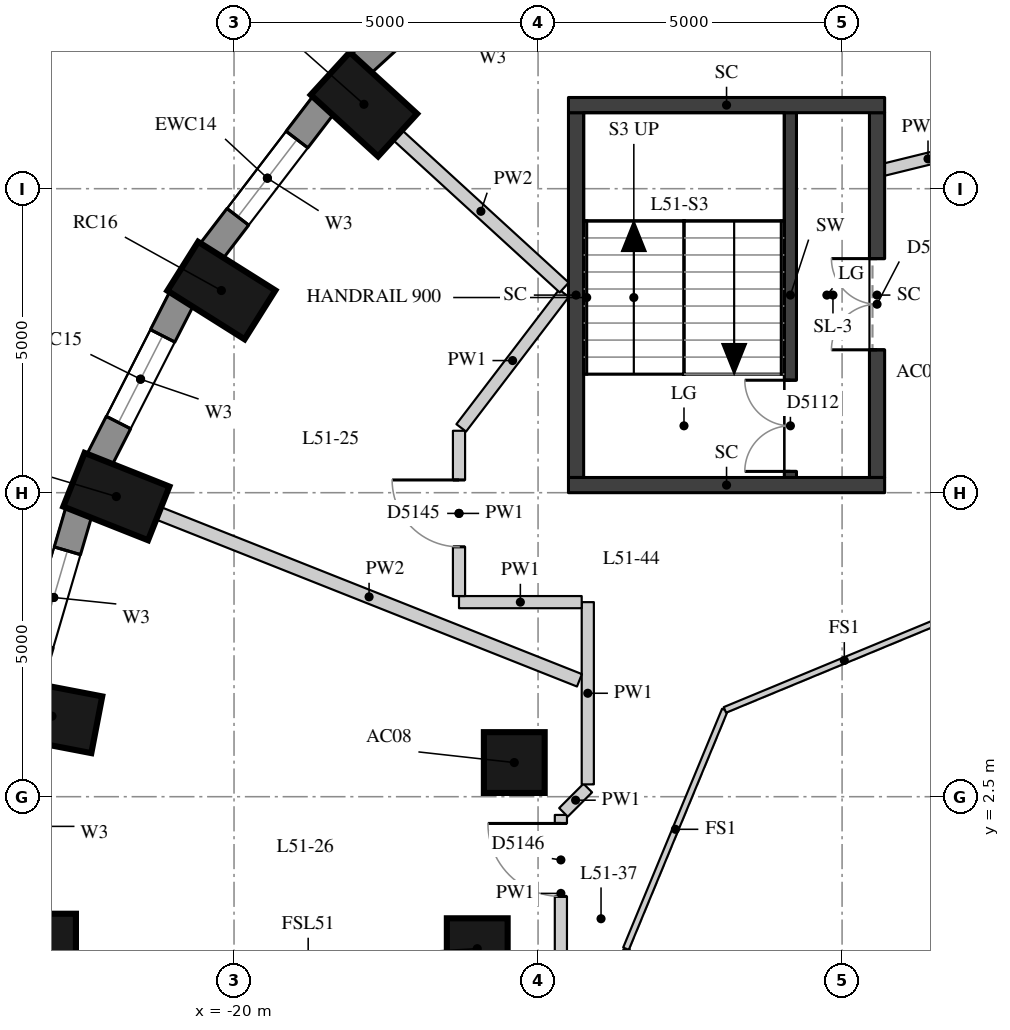
"""IFC4 building model, lengths in metres.
Left out: names, types, materials, properties, quantities, classifications, styles, units other than length and angle.
Written with IfcOpenShell. Run it as: python <this file> out.ifc"""

import sys

from ifc_helpers import new_model, si_unit, direction, frame, frame_2d, origin, origin_2d, place, context, subcontext, project, spatial, rectangle, extrude, element, fill, save


model = new_model("IFC4")
c1 = context("Model", 3, precision=1e-05, world=origin(), true_north=direction((0.0, 1.0)))
c2 = subcontext(c1, "Body", "Model", "MODEL_VIEW")
j1 = project(units=[si_unit("LENGTHUNIT", "METRE"), si_unit("PLANEANGLEUNIT", "RADIAN")], contexts=[c1])
p1 = place(None, origin())
s1 = spatial("IfcSite", under=j1, at=p1, CompositionType="ELEMENT")
p2 = place(p1, origin())
s2 = spatial("IfcBuilding", under=s1, at=p2, CompositionType="ELEMENT")
p3 = place(p2, frame((0.0, 0.0, 181.4)))
s3 = spatial("IfcBuildingStorey", under=s2, at=p3, CompositionType="ELEMENT", Elevation=181.4)
for number, where, z_axis, x_axis in (
    (1, (-17.864, 13.888, 0.0), (0.0, 0.0, 1.0), (-0.738, 0.675, 0.0)),
    (2, (-20.208, 10.825, 0.0), (0.0, 0.0, 1.0), (-0.846, 0.533, 0.0)),
    (3, (-21.936, 7.436, 0.0), (0.0, 0.0, 1.0), (-0.93, 0.369, 0.0)),
    (4, (-22.994, 3.825, 0.0), (0.0, 0.0, 1.0), (-0.982, 0.189, 0.0)),
    (5, (-23.35, 0.1, 0.0), (0.0, 0.0, 1.0), (-1.0, 0.0, 0.0)),
):
    element("IfcColumn", number, at=place(p3, frame(where, z_axis=z_axis, x_axis=x_axis)), inside=s3, PredefinedType="COLUMN", context=c2, shape_type="SweptSolid", body=[
        extrude(rectangle(XDim=1.5, YDim=0.95, at=origin_2d()), origin(), (0.0, 0.0, 1.0), 3.3),
    ])
for number, where, z_axis, x_axis in (
    (6, (-15.391, 3.062, 0.0), (0.0, 0.0, 1.0), (1.0, 0.0, 0.0)),
    (7, (-16.0, 0.0, 0.0), (0.0, 0.0, 1.0), (1.0, 0.0, 0.0)),
):
    element("IfcColumn", number, at=place(p3, frame(where, z_axis=z_axis, x_axis=x_axis)), inside=s3, PredefinedType="COLUMN", context=c2, shape_type="SweptSolid", body=[
        extrude(rectangle(XDim=1.0, YDim=1.0, at=origin_2d()), origin(), (0.0, 0.0, 1.0), 3.3),
    ])
p4 = place(p3, frame((-15.63, 16.639, 0.0), z_axis=(0.0, 0.0, 1.0), x_axis=(-0.737808755941, -0.675009807082, 0.0)))
e8 = element("IfcWall", 8, at=p4, inside=s3, PredefinedType="SOLIDWALL", context=c2, shape_type="SweptSolid", body=[
    extrude(rectangle(XDim=3.094, YDim=0.45, at=frame_2d((1.547, 0.0))), origin(), (0.0, 0.0, 1.0), 2.85),
])
p5 = place(p4, frame((0.747, 0.0, 0.4)))
e9 = element("IfcOpeningElement", 9, at=p5, cuts=e8, PredefinedType="OPENING", context=c2, shape_type="SweptSolid", body=[
    extrude(rectangle(XDim=1.6, YDim=1.75, at=frame_2d((0.8, 0.875))), frame((0.0, 0.235, 0.0), z_axis=(0.0, -1.0, 0.0), x_axis=(1.0, 0.0, 0.0)), (0.0, 0.0, 1.0), 0.47),
])
p6 = place(p3, frame((-18.528, 13.879, 0.0), z_axis=(0.0, 0.0, 1.0), x_axis=(-0.607817056371, -0.794077090706, 0.0)))
e10 = element("IfcWall", 10, at=p6, inside=s3, PredefinedType="SOLIDWALL", context=c2, shape_type="SweptSolid", body=[
    extrude(rectangle(XDim=3.037, YDim=0.45, at=frame_2d((1.519, 0.0))), origin(), (0.0, 0.0, 1.0), 2.85),
])
p7 = place(p6, frame((0.719, 0.0, 0.4)))
e11 = element("IfcOpeningElement", 11, at=p7, cuts=e10, PredefinedType="OPENING", context=c2, shape_type="SweptSolid", body=[
    extrude(rectangle(XDim=1.6, YDim=1.75, at=frame_2d((0.8, 0.875))), frame((0.0, 0.235, 0.0), z_axis=(0.0, -1.0, 0.0), x_axis=(1.0, 0.0, 0.0)), (0.0, 0.0, 1.0), 0.47),
])
p8 = place(p3, frame((-20.859, 10.697, 0.0), z_axis=(0.0, 0.0, 1.0), x_axis=(-0.454133999889, -0.890933392653, 0.0)))
e12 = element("IfcWall", 12, at=p8, inside=s3, PredefinedType="SOLIDWALL", context=c2, shape_type="SweptSolid", body=[
    extrude(rectangle(XDim=2.986, YDim=0.45, at=frame_2d((1.493, 0.0))), origin(), (0.0, 0.0, 1.0), 2.85),
])
p9 = place(p8, frame((0.693, 0.0, 0.4)))
e13 = element("IfcOpeningElement", 13, at=p9, cuts=e12, PredefinedType="OPENING", context=c2, shape_type="SweptSolid", body=[
    extrude(rectangle(XDim=1.6, YDim=1.75, at=frame_2d((0.8, 0.875))), frame((0.0, 0.235, 0.0), z_axis=(0.0, -1.0, 0.0), x_axis=(1.0, 0.0, 0.0)), (0.0, 0.0, 1.0), 0.47),
])
p10 = place(p3, frame((-22.551, 7.191, 0.0), z_axis=(0.0, 0.0, 1.0), x_axis=(-0.281125768296, -0.959670934435, 0.0)))
e14 = element("IfcWall", 14, at=p10, inside=s3, PredefinedType="SOLIDWALL", context=c2, shape_type="SweptSolid", body=[
    extrude(rectangle(XDim=2.948, YDim=0.45, at=frame_2d((1.474, 0.0))), origin(), (0.0, 0.0, 1.0), 2.85),
])
p11 = place(p10, frame((0.674, 0.0, 0.4)))
e15 = element("IfcOpeningElement", 15, at=p11, cuts=e14, PredefinedType="OPENING", context=c2, shape_type="SweptSolid", body=[
    extrude(rectangle(XDim=1.6, YDim=1.75, at=frame_2d((0.8, 0.875))), frame((0.0, 0.235, 0.0), z_axis=(0.0, -1.0, 0.0), x_axis=(1.0, 0.0, 0.0)), (0.0, 0.0, 1.0), 0.47),
])
p12 = place(p3, frame((-10.85, 7.75, 0.0), z_axis=(0.0, 0.0, 1.0), x_axis=(0.0, 1.0, 0.0)))
e16 = element("IfcWall", 16, at=p12, inside=s3, PredefinedType="SHEAR", context=c2, shape_type="SweptSolid", body=[
    extrude(rectangle(XDim=6.0, YDim=0.2, at=frame_2d((3.0, 0.0))), origin(), (0.0, 0.0, 1.0), 2.85),
])
p13 = place(p12, frame((0.1, 0.0, 0.0)))
e17 = element("IfcOpeningElement", 17, at=p13, cuts=e16, PredefinedType="OPENING", context=c2, shape_type="SweptSolid", body=[
    extrude(rectangle(XDim=1.5, YDim=2.1, at=frame_2d((0.75, 1.05))), frame((0.0, 0.11, 0.0), z_axis=(0.0, -1.0, 0.0), x_axis=(1.0, 0.0, 0.0)), (0.0, 0.0, 1.0), 0.22),
])
p14 = place(p3, frame((-14.375, 7.75, -0.28), z_axis=(0.0, 0.0, 1.0), x_axis=(0.0, 1.0, 0.0)))
e18 = element("IfcWall", 18, at=p14, inside=s3, PredefinedType="SHEAR", context=c2, shape_type="SweptSolid", body=[
    extrude(rectangle(XDim=6.0, YDim=0.25, at=frame_2d((3.0, 0.0))), origin(), (0.0, 0.0, 1.0), 3.13),
])
p15 = place(p3, frame((-9.425, 7.75, -0.28), z_axis=(0.0, 0.0, 1.0), x_axis=(0.0, 1.0, 0.0)))
e19 = element("IfcWall", 19, at=p15, inside=s3, PredefinedType="SHEAR", context=c2, shape_type="SweptSolid", body=[
    extrude(rectangle(XDim=6.0, YDim=0.25, at=frame_2d((3.0, 0.0))), origin(), (0.0, 0.0, 1.0), 3.13),
])
p16 = place(p15, frame((2.1, 0.0, 0.28)))
e20 = element("IfcOpeningElement", 20, at=p16, cuts=e19, PredefinedType="OPENING", context=c2, shape_type="SweptSolid", body=[
    extrude(rectangle(XDim=1.5, YDim=2.1, at=frame_2d((0.75, 1.05))), frame((0.0, 0.135, 0.0), z_axis=(0.0, -1.0, 0.0), x_axis=(1.0, 0.0, 0.0)), (0.0, 0.0, 1.0), 0.27),
])
for number, where, z_axis, x_axis in (
    (21, (-14.5, 13.875, -0.28), (0.0, 0.0, 1.0), (1.0, 0.0, 0.0)),
    (22, (-14.5, 7.625, -0.28), (0.0, 0.0, 1.0), (1.0, 0.0, 0.0)),
):
    element("IfcWall", number, at=place(p3, frame(where, z_axis=z_axis, x_axis=x_axis)), inside=s3, PredefinedType="SHEAR", context=c2, shape_type="SweptSolid", body=[
        extrude(rectangle(XDim=5.2, YDim=0.25, at=frame_2d((2.6, 0.0))), origin(), (0.0, 0.0, 1.0), 3.13),
    ])
p17 = place(p3, frame((-14.625, -0.381, 0.0), z_axis=(0.0, 0.0, 1.0), x_axis=(0.0, 1.0, 0.0)))
e23 = element("IfcWall", 23, at=p17, inside=s3, PredefinedType="PARTITIONING", context=c2, shape_type="SweptSolid", body=[
    extrude(rectangle(XDim=2.581, YDim=0.2, at=frame_2d((1.291, 0.0))), origin(), (0.0, 0.0, 1.0), 2.85),
])
p18 = place(p17, frame((1.241, 0.0, 0.0)))
e24 = element("IfcOpeningElement", 24, at=p18, cuts=e23, PredefinedType="OPENING", context=c2, shape_type="SweptSolid", body=[
    extrude(rectangle(XDim=1.2, YDim=2.1, at=frame_2d((0.6, 1.05))), frame((0.0, 0.11, 0.0), z_axis=(0.0, -1.0, 0.0), x_axis=(1.0, 0.0, 0.0)), (0.0, 0.0, 1.0), 0.22),
])
p19 = place(p3, frame((-14.582, 2.242, 0.0), z_axis=(0.0, 0.0, 1.0), x_axis=(0.706890969579, 0.707322526948, 0.0)))
e25 = element("IfcWall", 25, at=p19, inside=s3, PredefinedType="PARTITIONING", context=c2, shape_type="SweptSolid", body=[
    extrude(rectangle(XDim=0.566, YDim=0.2, at=frame_2d((0.283, 0.0))), origin(), (0.0, 0.0, 1.0), 2.85),
])
p20 = place(p3, frame((-14.182, 2.703, 0.0), z_axis=(0.0, 0.0, 1.0), x_axis=(0.0, 1.0, 0.0)))
e26 = element("IfcWall", 26, at=p20, inside=s3, PredefinedType="PARTITIONING", context=c2, shape_type="SweptSolid", body=[
    extrude(rectangle(XDim=2.997, YDim=0.2, at=frame_2d((1.499, 0.0))), origin(), (0.0, 0.0, 1.0), 2.85),
])
p21 = place(p3, frame((-14.282, 5.7, 0.0), z_axis=(0.0, 0.0, 1.0), x_axis=(-1.0, 0.0, 0.0)))
e27 = element("IfcWall", 27, at=p21, inside=s3, PredefinedType="PARTITIONING", context=c2, shape_type="SweptSolid", body=[
    extrude(rectangle(XDim=2.018, YDim=0.2, at=frame_2d((1.009, 0.0))), origin(), (0.0, 0.0, 1.0), 2.85),
])
p22 = place(p3, frame((-16.3, 5.8, 0.0), z_axis=(0.0, 0.0, 1.0), x_axis=(0.0, 1.0, 0.0)))
e28 = element("IfcWall", 28, at=p22, inside=s3, PredefinedType="PARTITIONING", context=c2, shape_type="SweptSolid", body=[
    extrude(rectangle(XDim=2.719, YDim=0.2, at=frame_2d((1.359, 0.0))), origin(), (0.0, 0.0, 1.0), 2.85),
])
p23 = place(p22, frame((0.809, 0.0, 0.0)))
e29 = element("IfcOpeningElement", 29, at=p23, cuts=e28, PredefinedType="OPENING", context=c2, shape_type="SweptSolid", body=[
    extrude(rectangle(XDim=1.1, YDim=2.1, at=frame_2d((0.55, 1.05))), frame((0.0, 0.11, 0.0), z_axis=(0.0, -1.0, 0.0), x_axis=(1.0, 0.0, 0.0)), (0.0, 0.0, 1.0), 0.22),
])
p24 = place(p3, frame((-16.263, 8.566, 0.0), z_axis=(0.0, 0.0, 1.0), x_axis=(0.606668946119, 0.794954583492, 0.0)))
e30 = element("IfcWall", 30, at=p24, inside=s3, PredefinedType="PARTITIONING", context=c2, shape_type="SweptSolid", body=[
    extrude(rectangle(XDim=2.785, YDim=0.2, at=frame_2d((1.393, 0.0))), origin(), (0.0, 0.0, 1.0), 2.85),
])
p25 = place(p3, frame((-9.474, 12.773, 0.0), z_axis=(0.0, 0.0, 1.0), x_axis=(0.971086426401, 0.238728197874, 0.0)))
e31 = element("IfcWall", 31, at=p25, inside=s3, PredefinedType="PARTITIONING", context=c2, shape_type="SweptSolid", body=[
    extrude(rectangle(XDim=1.826, YDim=0.2, at=frame_2d((0.913, 0.0))), origin(), (0.0, 0.0, 1.0), 2.4),
])
p26 = place(p3, frame((-17.31, 13.382, 0.0), z_axis=(0.0, 0.0, 1.0), x_axis=(0.737827699829, -0.674989100182, 0.0)))
e32 = element("IfcWall", 32, at=p26, inside=s3, PredefinedType="PARTITIONING", context=c2, shape_type="SweptSolid", body=[
    extrude(rectangle(XDim=3.714, YDim=0.22, at=frame_2d((1.857, 0.0))), origin(), (0.0, 0.0, 1.0), 2.85),
])
p27 = place(p3, frame((-21.239, 7.16, 0.0), z_axis=(0.0, 0.0, 1.0), x_axis=(0.929511234156, -0.368793798182, 0.0)))
e33 = element("IfcWall", 33, at=p27, inside=s3, PredefinedType="PARTITIONING", context=c2, shape_type="SweptSolid", body=[
    extrude(rectangle(XDim=7.444, YDim=0.22, at=frame_2d((3.722, 0.0))), origin(), (0.0, 0.0, 1.0), 2.85),
])
for number, where, z_axis, x_axis in (
    (34, (-11.927, -3.927, 0.0), (0.0, 0.0, 1.0), (-0.383, 0.924, 0.0)),
    (35, (-13.554, 0.0, 0.0), (0.0, 0.0, 1.0), (0.383, 0.924, 0.0)),
    (36, (-11.927, 3.927, 0.0), (0.0, 0.0, 1.0), (0.924, 0.383, 0.0)),
):
    element("IfcWall", number, at=place(p3, frame(where, z_axis=z_axis, x_axis=x_axis)), inside=s3, PredefinedType="PARTITIONING", context=c2, shape_type="SweptSolid", body=[
        extrude(rectangle(XDim=4.251, YDim=0.1, at=frame_2d((2.125, 0.0))), origin(), (0.0, 0.0, 1.0), 2.85),
    ])
p28 = place(p7, origin())
e37 = element("IfcWindow", 37, at=p28, inside=s3, PartitioningType="SINGLE_PANEL", PredefinedType="WINDOW", context=c2, shape_type="SweptSolid", body=[
    extrude(rectangle(XDim=1.6, YDim=1.75, at=frame_2d((0.8, 0.875))), frame((0.0, 0.035, 0.0), z_axis=(0.0, -1.0, 0.0), x_axis=(1.0, 0.0, 0.0)), (0.0, 0.0, 1.0), 0.06),
])
fill(e11, e37)
p29 = place(p9, origin())
e38 = element("IfcWindow", 38, at=p29, inside=s3, PartitioningType="SINGLE_PANEL", PredefinedType="WINDOW", context=c2, shape_type="SweptSolid", body=[
    extrude(rectangle(XDim=1.6, YDim=1.75, at=frame_2d((0.8, 0.875))), frame((0.0, 0.035, 0.0), z_axis=(0.0, -1.0, 0.0), x_axis=(1.0, 0.0, 0.0)), (0.0, 0.0, 1.0), 0.06),
])
fill(e13, e38)
p30 = place(p11, origin())
e39 = element("IfcWindow", 39, at=p30, inside=s3, PartitioningType="SINGLE_PANEL", PredefinedType="WINDOW", context=c2, shape_type="SweptSolid", body=[
    extrude(rectangle(XDim=1.6, YDim=1.75, at=frame_2d((0.8, 0.875))), frame((0.0, 0.035, 0.0), z_axis=(0.0, -1.0, 0.0), x_axis=(1.0, 0.0, 0.0)), (0.0, 0.0, 1.0), 0.06),
])
fill(e15, e39)
p31 = place(p13, origin())
e40 = element("IfcDoor", 40, at=p31, inside=s3, OperationType="DOUBLE_DOOR_SINGLE_SWING", PredefinedType="DOOR", context=c2, shape_type="SweptSolid", body=[
    extrude(rectangle(XDim=1.5, YDim=2.1, at=frame_2d((0.75, 1.05))), frame((0.0, 0.025, 0.0), z_axis=(0.0, -1.0, 0.0), x_axis=(1.0, 0.0, 0.0)), (0.0, 0.0, 1.0), 0.05),
])
fill(e17, e40)
p32 = place(p16, origin())
e41 = element("IfcDoor", 41, at=p32, inside=s3, OperationType="DOUBLE_DOOR_SINGLE_SWING", PredefinedType="DOOR", context=c2, shape_type="SweptSolid", body=[
    extrude(rectangle(XDim=1.5, YDim=2.1, at=frame_2d((0.75, 1.05))), frame((0.0, 0.025, 0.0), z_axis=(0.0, -1.0, 0.0), x_axis=(1.0, 0.0, 0.0)), (0.0, 0.0, 1.0), 0.05),
])
fill(e20, e41)
p33 = place(p23, origin())
e42 = element("IfcDoor", 42, at=p33, inside=s3, OperationType="SINGLE_SWING_RIGHT", PredefinedType="DOOR", context=c2, shape_type="SweptSolid", body=[
    extrude(rectangle(XDim=1.1, YDim=2.1, at=frame_2d((0.55, 1.05))), frame((0.0, 0.025, 0.0), z_axis=(0.0, -1.0, 0.0), x_axis=(1.0, 0.0, 0.0)), (0.0, 0.0, 1.0), 0.05),
])
fill(e29, e42)
p34 = place(p18, origin())
e43 = element("IfcDoor", 43, at=p34, inside=s3, OperationType="SINGLE_SWING_RIGHT", PredefinedType="DOOR", context=c2, shape_type="SweptSolid", body=[
    extrude(rectangle(XDim=1.2, YDim=2.1, at=frame_2d((0.6, 1.05))), frame((0.0, 0.025, 0.0), z_axis=(0.0, -1.0, 0.0), x_axis=(1.0, 0.0, 0.0)), (0.0, 0.0, 1.0), 0.05),
])
fill(e24, e43)
save(model, sys.argv[1])
